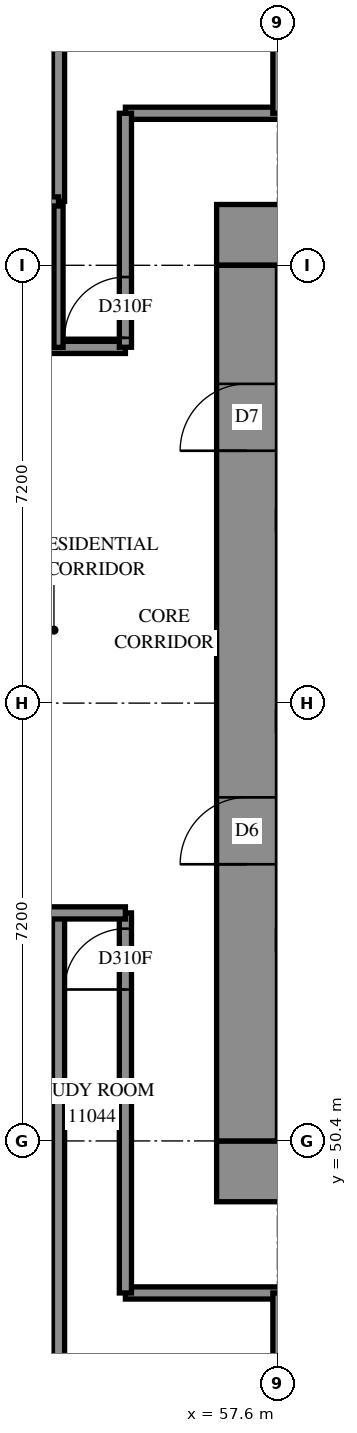
"""IFC4 building model, lengths in metres.
Left out: names, types, materials, properties, quantities, classifications, styles, units other than length and angle.
Written with IfcOpenShell. Run it as: python <this file> out.ifc"""

import sys

from ifc_helpers import new_model, si_unit, direction, frame, frame_2d, origin, place, context, subcontext, project, spatial, rectangle, extrude, element, fill, save


model = new_model("IFC4")
c1 = context("Model", 3, precision=1e-05, world=origin(), true_north=direction((0.0, 1.0)))
c2 = subcontext(c1, "Body", "Model", "MODEL_VIEW")
j1 = project(units=[si_unit("LENGTHUNIT", "METRE"), si_unit("PLANEANGLEUNIT", "RADIAN")], contexts=[c1])
p1 = place(None, origin())
s1 = spatial("IfcSite", under=j1, at=p1, CompositionType="ELEMENT")
p2 = place(p1, origin())
s2 = spatial("IfcBuilding", under=s1, at=p2, CompositionType="ELEMENT")
p3 = place(p2, frame((0.0, 0.0, 44.0)))
s3 = spatial("IfcBuildingStorey", under=s2, at=p3, CompositionType="ELEMENT", Elevation=44.0)
p4 = place(p3, frame((56.6, 49.9, -0.3), z_axis=(0.0, 0.0, 1.0), x_axis=(1.0, 0.0, 0.0)))
e1 = element("IfcWall", 1, at=p4, inside=s3, PredefinedType="SHEAR", context=c2, shape_type="SweptSolid", body=[
    extrude(rectangle(XDim=16.4, YDim=1.0, at=frame_2d((8.2, 0.0))), origin(), (0.0, 0.0, 1.0), 2.7),
])
p5 = place(p3, frame((56.6, 65.3, -0.3), z_axis=(0.0, 0.0, 1.0), x_axis=(1.0, 0.0, 0.0)))
e2 = element("IfcWall", 2, at=p5, inside=s3, PredefinedType="SHEAR", context=c2, shape_type="SweptSolid", body=[
    extrude(rectangle(XDim=16.4, YDim=1.0, at=frame_2d((8.2, 0.0))), origin(), (0.0, 0.0, 1.0), 2.7),
])
p6 = place(p5, frame((11.0, 0.0, 0.3)))
e3 = element("IfcOpeningElement", 3, at=p6, cuts=e2, PredefinedType="OPENING", context=c2, shape_type="SweptSolid", body=[
    extrude(rectangle(XDim=0.8, YDim=2.1, at=frame_2d((0.4, 1.05))), frame((0.0, 0.51, 0.0), z_axis=(0.0, -1.0, 0.0), x_axis=(1.0, 0.0, 0.0)), (0.0, 0.0, 1.0), 1.02),
])
p7 = place(p3, frame((57.1, 50.4, -0.3), z_axis=(0.0, 0.0, 1.0), x_axis=(0.0, 1.0, 0.0)))
e4 = element("IfcWall", 4, at=p7, inside=s3, PredefinedType="SHEAR", context=c2, shape_type="SweptSolid", body=[
    extrude(rectangle(XDim=14.4, YDim=1.0, at=frame_2d((7.2, 0.0))), origin(), (0.0, 0.0, 1.0), 2.7),
])
p8 = place(p7, frame((4.55, 0.0, 0.3)))
e5 = element("IfcOpeningElement", 5, at=p8, cuts=e4, PredefinedType="OPENING", context=c2, shape_type="SweptSolid", body=[
    extrude(rectangle(XDim=1.1, YDim=2.1, at=frame_2d((0.55, 1.05))), frame((0.0, 0.51, 0.0), z_axis=(0.0, -1.0, 0.0), x_axis=(1.0, 0.0, 0.0)), (0.0, 0.0, 1.0), 1.02),
])
p9 = place(p7, frame((11.35, 0.0, 0.3)))
e6 = element("IfcOpeningElement", 6, at=p9, cuts=e4, PredefinedType="OPENING", context=c2, shape_type="SweptSolid", body=[
    extrude(rectangle(XDim=1.1, YDim=2.1, at=frame_2d((0.55, 1.05))), frame((0.0, 0.51, 0.0), z_axis=(0.0, -1.0, 0.0), x_axis=(1.0, 0.0, 0.0)), (0.0, 0.0, 1.0), 1.02),
])
p10 = place(p3, frame((33.452, 63.45, 0.0), z_axis=(0.0, 0.0, 1.0), x_axis=(1.0, 0.0, 0.0)))
e7 = element("IfcWall", 7, at=p10, inside=s3, PredefinedType="PARTITIONING", context=c2, shape_type="SweptSolid", body=[
    extrude(rectangle(XDim=21.648, YDim=0.2, at=frame_2d((10.824, 0.0))), origin(), (0.0, 0.0, 1.0), 3.1),
])
p11 = place(p10, frame((0.142, 0.0, 0.0)))
e8 = element("IfcOpeningElement", 8, at=p11, cuts=e7, PredefinedType="OPENING", context=c2, shape_type="SweptSolid", body=[
    extrude(rectangle(XDim=1.0, YDim=2.1, at=frame_2d((0.5, 1.05))), frame((0.0, 0.11, 0.0), z_axis=(0.0, -1.0, 0.0), x_axis=(1.0, 0.0, 0.0)), (0.0, 0.0, 1.0), 0.22),
])
p12 = place(p10, frame((6.412, 0.0, 0.0)))
e9 = element("IfcOpeningElement", 9, at=p12, cuts=e7, PredefinedType="OPENING", context=c2, shape_type="SweptSolid", body=[
    extrude(rectangle(XDim=0.9, YDim=2.1, at=frame_2d((0.45, 1.05))), frame((0.0, 0.11, 0.0), z_axis=(0.0, -1.0, 0.0), x_axis=(1.0, 0.0, 0.0)), (0.0, 0.0, 1.0), 0.22),
])
p13 = place(p10, frame((14.168, 0.0, 0.0)))
e10 = element("IfcOpeningElement", 10, at=p13, cuts=e7, PredefinedType="OPENING", context=c2, shape_type="SweptSolid", body=[
    extrude(rectangle(XDim=0.9, YDim=2.1, at=frame_2d((0.45, 1.05))), frame((0.0, 0.11, 0.0), z_axis=(0.0, -1.0, 0.0), x_axis=(1.0, 0.0, 0.0)), (0.0, 0.0, 1.0), 0.22),
])
p14 = place(p10, frame((17.651, 0.0, 0.0)))
e11 = element("IfcOpeningElement", 11, at=p14, cuts=e7, PredefinedType="OPENING", context=c2, shape_type="SweptSolid", body=[
    extrude(rectangle(XDim=0.9, YDim=2.1, at=frame_2d((0.45, 1.05))), frame((0.0, 0.11, 0.0), z_axis=(0.0, -1.0, 0.0), x_axis=(1.0, 0.0, 0.0)), (0.0, 0.0, 1.0), 0.22),
])
p15 = place(p3, frame((55.1, 67.3, 0.0), z_axis=(0.0, 0.0, 1.0), x_axis=(1.0, 0.0, 0.0)))
e12 = element("IfcWall", 12, at=p15, inside=s3, PredefinedType="PARTITIONING", context=c2, shape_type="SweptSolid", body=[
    extrude(rectangle(XDim=19.4, YDim=0.2, at=frame_2d((9.7, 0.0))), origin(), (0.0, 0.0, 1.0), 3.1),
])
p16 = place(p15, frame((6.399, 0.0, 0.0)))
e13 = element("IfcOpeningElement", 13, at=p16, cuts=e12, PredefinedType="OPENING", context=c2, shape_type="SweptSolid", body=[
    extrude(rectangle(XDim=0.9, YDim=2.1, at=frame_2d((0.45, 1.05))), frame((0.0, 0.11, 0.0), z_axis=(0.0, -1.0, 0.0), x_axis=(1.0, 0.0, 0.0)), (0.0, 0.0, 1.0), 0.22),
])
p17 = place(p15, frame((13.599, 0.0, 0.0)))
e14 = element("IfcOpeningElement", 14, at=p17, cuts=e12, PredefinedType="OPENING", context=c2, shape_type="SweptSolid", body=[
    extrude(rectangle(XDim=0.9, YDim=2.1, at=frame_2d((0.45, 1.05))), frame((0.0, 0.11, 0.0), z_axis=(0.0, -1.0, 0.0), x_axis=(1.0, 0.0, 0.0)), (0.0, 0.0, 1.0), 0.22),
])
p18 = place(p3, frame((55.1, 47.9, 0.0), z_axis=(0.0, 0.0, 1.0), x_axis=(1.0, 0.0, 0.0)))
e15 = element("IfcWall", 15, at=p18, inside=s3, PredefinedType="PARTITIONING", context=c2, shape_type="SweptSolid", body=[
    extrude(rectangle(XDim=19.204, YDim=0.2, at=frame_2d((9.602, 0.0))), origin(), (0.0, 0.0, 1.0), 3.1),
])
p19 = place(p18, frame((6.399, 0.0, 0.0)))
e16 = element("IfcOpeningElement", 16, at=p19, cuts=e15, PredefinedType="OPENING", context=c2, shape_type="SweptSolid", body=[
    extrude(rectangle(XDim=0.9, YDim=2.1, at=frame_2d((0.45, 1.05))), frame((0.0, 0.11, 0.0), z_axis=(0.0, -1.0, 0.0), x_axis=(1.0, 0.0, 0.0)), (0.0, 0.0, 1.0), 0.22),
])
p20 = place(p18, frame((13.599, 0.0, 0.0)))
e17 = element("IfcOpeningElement", 17, at=p20, cuts=e15, PredefinedType="OPENING", context=c2, shape_type="SweptSolid", body=[
    extrude(rectangle(XDim=0.9, YDim=2.1, at=frame_2d((0.45, 1.05))), frame((0.0, 0.11, 0.0), z_axis=(0.0, -1.0, 0.0), x_axis=(1.0, 0.0, 0.0)), (0.0, 0.0, 1.0), 0.22),
])
p21 = place(p3, frame((54.0, 42.372, 0.0), z_axis=(0.0, 0.0, 1.0), x_axis=(0.0, 1.0, 0.0)))
e18 = element("IfcWall", 18, at=p21, inside=s3, PredefinedType="PARTITIONING", context=c2, shape_type="SweptSolid", body=[
    extrude(rectangle(XDim=11.778, YDim=0.2, at=frame_2d((5.889, 0.0))), origin(), (0.0, 0.0, 1.0), 3.1),
])
p22 = place(p3, frame((54.0, 65.85, 0.0), z_axis=(0.0, 0.0, 1.0), x_axis=(0.0, 1.0, 0.0)))
e19 = element("IfcWall", 19, at=p22, inside=s3, PredefinedType="PARTITIONING", context=c2, shape_type="SweptSolid", body=[
    extrude(rectangle(XDim=6.851, YDim=0.2, at=frame_2d((3.425, 0.0))), origin(), (0.0, 0.0, 1.0), 3.1),
])
p23 = place(p3, frame((55.1, 47.9, 0.0), z_axis=(0.0, 0.0, 1.0), x_axis=(0.0, 1.0, 0.0)))
e20 = element("IfcWall", 20, at=p23, inside=s3, PredefinedType="PARTITIONING", context=c2, shape_type="SweptSolid", body=[
    extrude(rectangle(XDim=6.25, YDim=0.2, at=frame_2d((3.125, 0.0))), origin(), (0.0, 0.0, 1.0), 3.1),
])
p24 = place(p23, frame((4.99, 0.0, 0.0)))
e21 = element("IfcOpeningElement", 21, at=p24, cuts=e20, PredefinedType="OPENING", context=c2, shape_type="SweptSolid", body=[
    extrude(rectangle(XDim=1.0, YDim=2.1, at=frame_2d((0.5, 1.05))), frame((0.0, 0.11, 0.0), z_axis=(0.0, -1.0, 0.0), x_axis=(1.0, 0.0, 0.0)), (0.0, 0.0, 1.0), 0.22),
])
p25 = place(p3, frame((50.4, 54.15, 0.0), z_axis=(0.0, 0.0, 1.0), x_axis=(1.0, 0.0, 0.0)))
e22 = element("IfcWall", 22, at=p25, inside=s3, PredefinedType="PARTITIONING", context=c2, shape_type="SweptSolid", body=[
    extrude(rectangle(XDim=4.7, YDim=0.2, at=frame_2d((2.35, 0.0))), origin(), (0.0, 0.0, 1.0), 3.1),
])
p26 = place(p25, frame((2.3, 0.0, 0.0)))
e23 = element("IfcOpeningElement", 23, at=p26, cuts=e22, PredefinedType="OPENING", context=c2, shape_type="SweptSolid", body=[
    extrude(rectangle(XDim=0.9, YDim=2.1, at=frame_2d((0.45, 1.05))), frame((0.0, 0.11, 0.0), z_axis=(0.0, -1.0, 0.0), x_axis=(1.0, 0.0, 0.0)), (0.0, 0.0, 1.0), 0.22),
])
p27 = place(p3, frame((55.1, 63.452, 0.0), z_axis=(0.0, 0.0, 1.0), x_axis=(0.0, 1.0, 0.0)))
e24 = element("IfcWall", 24, at=p27, inside=s3, PredefinedType="PARTITIONING", context=c2, shape_type="SweptSolid", body=[
    extrude(rectangle(XDim=3.848, YDim=0.2, at=frame_2d((1.924, 0.0))), origin(), (0.0, 0.0, 1.0), 3.1),
])
p28 = place(p27, frame((0.155, 0.0, 0.0)))
e25 = element("IfcOpeningElement", 25, at=p28, cuts=e24, PredefinedType="OPENING", context=c2, shape_type="SweptSolid", body=[
    extrude(rectangle(XDim=1.0, YDim=2.1, at=frame_2d((0.5, 1.05))), frame((0.0, 0.11, 0.0), z_axis=(0.0, -1.0, 0.0), x_axis=(1.0, 0.0, 0.0)), (0.0, 0.0, 1.0), 0.22),
])
for number, where, z_axis, x_axis in (
    (26, (57.6, 67.3, 0.0), (0.0, 0.0, 1.0), (0.0, 1.0, 0.0)),
    (27, (57.6, 45.5, 0.0), (0.0, 0.0, 1.0), (0.0, 1.0, 0.0)),
    (28, (54.0, 63.45, 0.0), (0.0, 0.0, 1.0), (0.0, 1.0, 0.0)),
):
    element("IfcWall", number, at=place(p3, frame(where, z_axis=z_axis, x_axis=x_axis)), inside=s3, PredefinedType="PARTITIONING", context=c2, shape_type="SweptSolid", body=[
        extrude(rectangle(XDim=2.4, YDim=0.15, at=frame_2d((1.2, 0.0))), origin(), (0.0, 0.0, 1.0), 3.1),
    ])
p29 = place(p3, frame((52.1, 65.85, 0.0), z_axis=(0.0, 0.0, 1.0), x_axis=(1.0, 0.0, 0.0)))
e29 = element("IfcWall", 29, at=p29, inside=s3, PredefinedType="PARTITIONING", context=c2, shape_type="SweptSolid", body=[
    extrude(rectangle(XDim=1.9, YDim=0.15, at=frame_2d((0.95, 0.0))), origin(), (0.0, 0.0, 1.0), 3.1),
])
p30 = place(p29, frame((0.493, 0.0, 0.0)))
e30 = element("IfcOpeningElement", 30, at=p30, cuts=e29, PredefinedType="OPENING", context=c2, shape_type="SweptSolid", body=[
    extrude(rectangle(XDim=0.8, YDim=2.1, at=frame_2d((0.4, 1.05))), frame((0.0, 0.085, 0.0), z_axis=(0.0, -1.0, 0.0), x_axis=(1.0, 0.0, 0.0)), (0.0, 0.0, 1.0), 0.17),
])
p31 = place(p8, origin())
e31 = element("IfcDoor", 31, at=p31, inside=s3, OperationType="DOUBLE_DOOR_SINGLE_SWING", PredefinedType="DOOR", context=c2, shape_type="SweptSolid", body=[
    extrude(rectangle(XDim=1.1, YDim=2.1, at=frame_2d((0.55, 1.05))), frame((0.0, 0.025, 0.0), z_axis=(0.0, -1.0, 0.0), x_axis=(1.0, 0.0, 0.0)), (0.0, 0.0, 1.0), 0.05),
])
fill(e5, e31)
p32 = place(p9, origin())
e32 = element("IfcDoor", 32, at=p32, inside=s3, OperationType="SINGLE_SWING_LEFT", PredefinedType="DOOR", context=c2, shape_type="SweptSolid", body=[
    extrude(rectangle(XDim=1.1, YDim=2.1, at=frame_2d((0.55, 1.05))), frame((0.0, 0.025, 0.0), z_axis=(0.0, -1.0, 0.0), x_axis=(1.0, 0.0, 0.0)), (0.0, 0.0, 1.0), 0.05),
])
fill(e6, e32)
p33 = place(p28, origin())
e33 = element("IfcDoor", 33, at=p33, inside=s3, OperationType="SINGLE_SWING_LEFT", PredefinedType="DOOR", context=c2, shape_type="SweptSolid", body=[
    extrude(rectangle(XDim=1.0, YDim=2.1, at=frame_2d((0.5, 1.05))), frame((0.0, 0.025, 0.0), z_axis=(0.0, -1.0, 0.0), x_axis=(1.0, 0.0, 0.0)), (0.0, 0.0, 1.0), 0.05),
])
fill(e25, e33)
p34 = place(p24, origin())
e34 = element("IfcDoor", 34, at=p34, inside=s3, OperationType="SINGLE_SWING_RIGHT", PredefinedType="DOOR", context=c2, shape_type="SweptSolid", body=[
    extrude(rectangle(XDim=1.0, YDim=2.1, at=frame_2d((0.5, 1.05))), frame((0.0, 0.025, 0.0), z_axis=(0.0, -1.0, 0.0), x_axis=(1.0, 0.0, 0.0)), (0.0, 0.0, 1.0), 0.05),
])
fill(e21, e34)
save(model, sys.argv[1])
